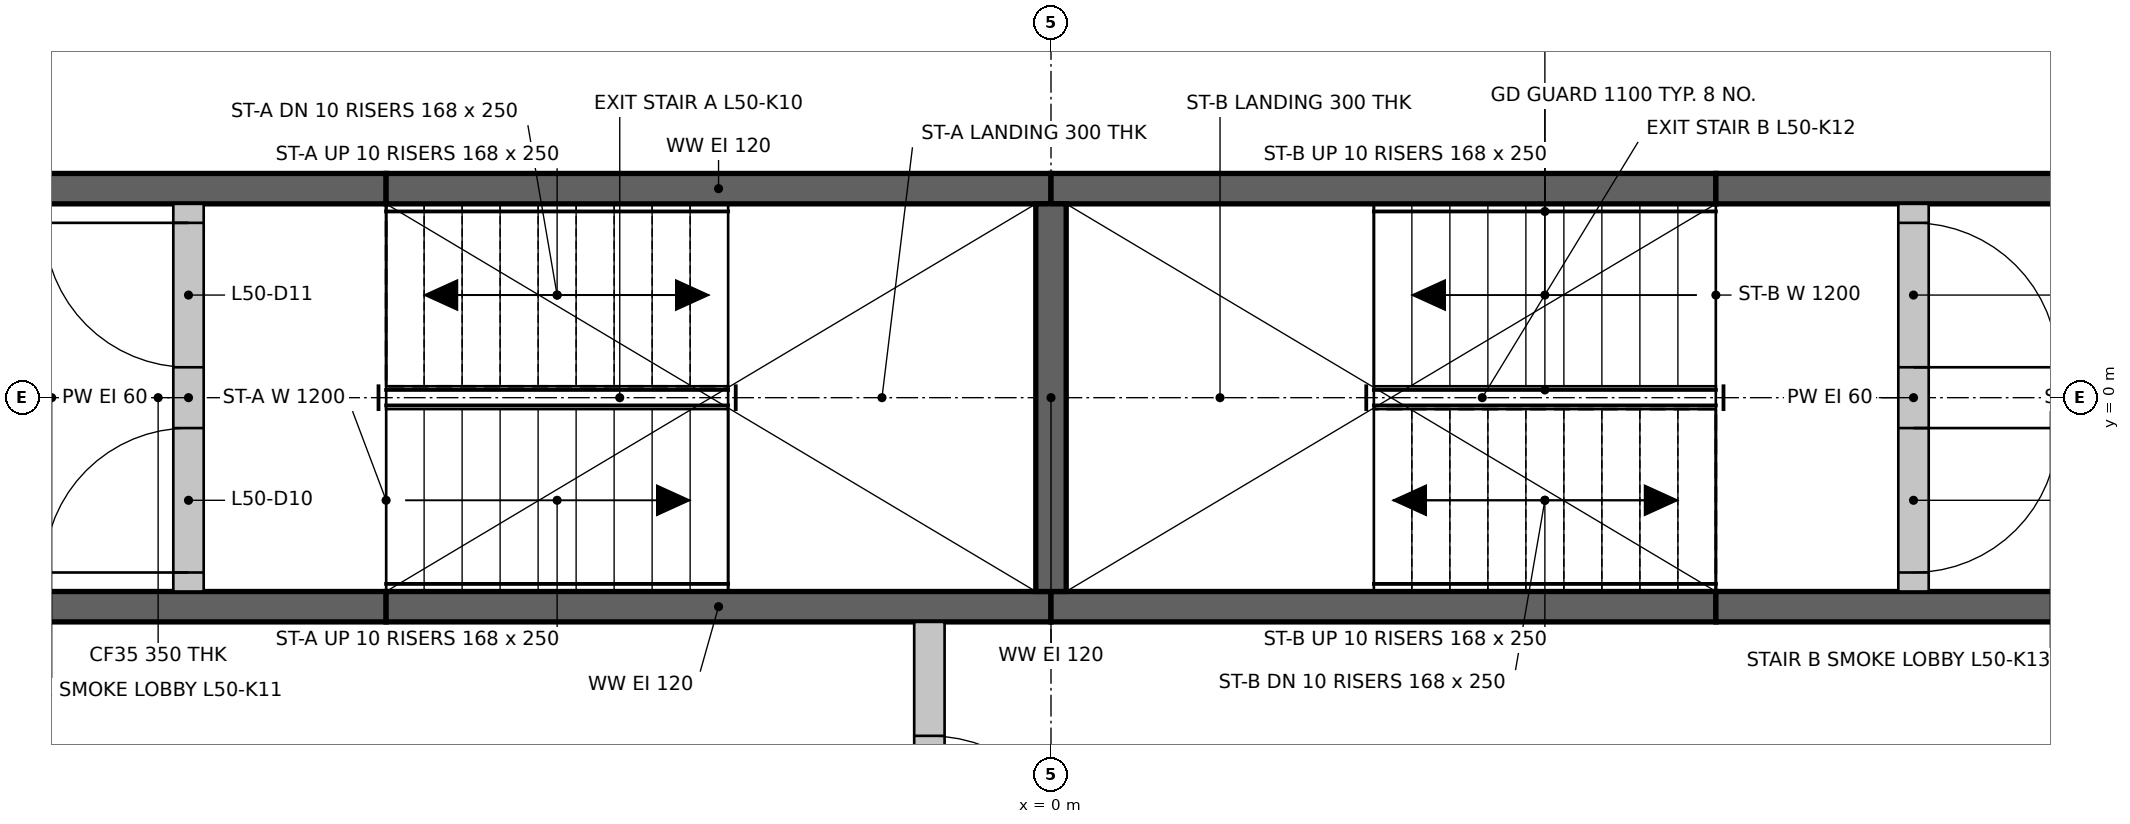
"""IFC4 building model, lengths in metres.
Left out: names, types, materials, properties, quantities, classifications, styles, units other than length and angle.
Written with IfcOpenShell. Run it as: python <this file> out.ifc"""

import sys

from ifc_helpers import new_model, si_unit, direction, frame, frame_2d, origin, place, context, subcontext, project, spatial, rectangle, extrude, element, fill, save


model = new_model("IFC4")
c1 = context("Model", 3, precision=1e-05, world=origin(), true_north=direction((0.0, 1.0)))
c2 = subcontext(c1, "Body", "Model", "MODEL_VIEW")
j1 = project(units=[si_unit("LENGTHUNIT", "METRE"), si_unit("PLANEANGLEUNIT", "RADIAN")], contexts=[c1])
p1 = place(None, origin())
s1 = spatial("IfcSite", under=j1, at=p1, CompositionType="ELEMENT")
p2 = place(p1, origin())
s2 = spatial("IfcBuilding", under=s1, at=p2, CompositionType="ELEMENT")
p3 = place(p2, frame((0.0, 0.0, 191.0)))
s3 = spatial("IfcBuildingStorey", under=s2, at=p3, CompositionType="ELEMENT", Elevation=191.0)
p4 = place(p3, frame((-7.374, -1.375, 0.0), z_axis=(0.0, 0.0, 1.0), x_axis=(1.0, 0.0, 0.0)))
e1 = element("IfcWall", 1, at=p4, inside=s3, PredefinedType="SHEAR", context=c2, shape_type="SweptSolid", body=[
    extrude(rectangle(XDim=3.0, YDim=0.2, at=frame_2d((1.5, 0.0))), origin(), (0.0, 0.0, 1.0), 3.0),
])
for number, where, z_axis, x_axis in (
    (2, (-4.374, -1.375, 0.0), (0.0, 0.0, 1.0), (1.0, 0.0, 0.0)),
    (3, (0.0, -1.375, 0.0), (0.0, 0.0, 1.0), (1.0, 0.0, 0.0)),
):
    element("IfcWall", number, at=place(p3, frame(where, z_axis=z_axis, x_axis=x_axis)), inside=s3, PredefinedType="SHEAR", context=c2, shape_type="SweptSolid", body=[
        extrude(rectangle(XDim=4.374, YDim=0.2, at=frame_2d((2.187, 0.0))), origin(), (0.0, 0.0, 1.0), 3.0),
    ])
for number, where, z_axis, x_axis in (
    (4, (4.374, -1.375, 0.0), (0.0, 0.0, 1.0), (1.0, 0.0, 0.0)),
    (5, (-7.374, 1.375, 0.0), (0.0, 0.0, 1.0), (1.0, 0.0, 0.0)),
):
    element("IfcWall", number, at=place(p3, frame(where, z_axis=z_axis, x_axis=x_axis)), inside=s3, PredefinedType="SHEAR", context=c2, shape_type="SweptSolid", body=[
        extrude(rectangle(XDim=3.0, YDim=0.2, at=frame_2d((1.5, 0.0))), origin(), (0.0, 0.0, 1.0), 3.0),
    ])
for number, where, z_axis, x_axis in (
    (6, (-4.374, 1.375, 0.0), (0.0, 0.0, 1.0), (1.0, 0.0, 0.0)),
    (7, (0.0, 1.375, 0.0), (0.0, 0.0, 1.0), (1.0, 0.0, 0.0)),
):
    element("IfcWall", number, at=place(p3, frame(where, z_axis=z_axis, x_axis=x_axis)), inside=s3, PredefinedType="SHEAR", context=c2, shape_type="SweptSolid", body=[
        extrude(rectangle(XDim=4.374, YDim=0.2, at=frame_2d((2.187, 0.0))), origin(), (0.0, 0.0, 1.0), 3.0),
    ])
p5 = place(p3, frame((4.374, 1.375, 0.0), z_axis=(0.0, 0.0, 1.0), x_axis=(1.0, 0.0, 0.0)))
e8 = element("IfcWall", 8, at=p5, inside=s3, PredefinedType="SHEAR", context=c2, shape_type="SweptSolid", body=[
    extrude(rectangle(XDim=3.0, YDim=0.2, at=frame_2d((1.5, 0.0))), origin(), (0.0, 0.0, 1.0), 3.0),
])
p6 = place(p3, frame((0.0, -1.275, 0.0), z_axis=(0.0, 0.0, 1.0), x_axis=(0.0, 1.0, 0.0)))
e9 = element("IfcWall", 9, at=p6, inside=s3, PredefinedType="SHEAR", context=c2, shape_type="SweptSolid", body=[
    extrude(rectangle(XDim=2.55, YDim=0.2, at=frame_2d((1.275, 0.0))), origin(), (0.0, 0.0, 1.0), 3.0),
])
p7 = place(p3, frame((-0.8, -3.974, 0.0), z_axis=(0.0, 0.0, 1.0), x_axis=(0.0, 1.0, 0.0)))
e10 = element("IfcWall", 10, at=p7, inside=s3, PredefinedType="PARTITIONING", context=c2, shape_type="SweptSolid", body=[
    extrude(rectangle(XDim=2.499, YDim=0.2, at=frame_2d((1.25, 0.0))), origin(), (0.0, 0.0, 1.0), 3.0),
])
p8 = place(p7, frame((0.75, 0.0, 0.0)))
e11 = element("IfcOpeningElement", 11, at=p8, cuts=e10, PredefinedType="OPENING", context=c2, shape_type="SweptSolid", body=[
    extrude(rectangle(XDim=1.0, YDim=2.1, at=frame_2d((0.5, 1.05))), frame((0.0, 0.11, 0.0), z_axis=(0.0, -1.0, 0.0), x_axis=(1.0, 0.0, 0.0)), (0.0, 0.0, 1.0), 0.22),
])
p9 = place(p3, frame((-5.674, -1.275, 0.0), z_axis=(0.0, 0.0, 1.0), x_axis=(0.0, 1.0, 0.0)))
e12 = element("IfcWall", 12, at=p9, inside=s3, PredefinedType="PARTITIONING", context=c2, shape_type="SweptSolid", body=[
    extrude(rectangle(XDim=2.55, YDim=0.2, at=frame_2d((1.275, 0.0))), origin(), (0.0, 0.0, 1.0), 3.0),
])
p10 = place(p9, frame((0.125, 0.0, 0.0)))
e13 = element("IfcOpeningElement", 13, at=p10, cuts=e12, PredefinedType="OPENING", context=c2, shape_type="SweptSolid", body=[
    extrude(rectangle(XDim=0.95, YDim=2.1, at=frame_2d((0.475, 1.05))), frame((0.0, 0.11, 0.0), z_axis=(0.0, -1.0, 0.0), x_axis=(1.0, 0.0, 0.0)), (0.0, 0.0, 1.0), 0.22),
])
p11 = place(p9, frame((1.475, 0.0, 0.0)))
e14 = element("IfcOpeningElement", 14, at=p11, cuts=e12, PredefinedType="OPENING", context=c2, shape_type="SweptSolid", body=[
    extrude(rectangle(XDim=0.95, YDim=2.1, at=frame_2d((0.475, 1.05))), frame((0.0, 0.11, 0.0), z_axis=(0.0, -1.0, 0.0), x_axis=(1.0, 0.0, 0.0)), (0.0, 0.0, 1.0), 0.22),
])
p12 = place(p3, frame((5.674, -1.275, 0.0), z_axis=(0.0, 0.0, 1.0), x_axis=(0.0, 1.0, 0.0)))
e15 = element("IfcWall", 15, at=p12, inside=s3, PredefinedType="PARTITIONING", context=c2, shape_type="SweptSolid", body=[
    extrude(rectangle(XDim=2.55, YDim=0.2, at=frame_2d((1.275, 0.0))), origin(), (0.0, 0.0, 1.0), 3.0),
])
p13 = place(p12, frame((0.125, 0.0, 0.0)))
e16 = element("IfcOpeningElement", 16, at=p13, cuts=e15, PredefinedType="OPENING", context=c2, shape_type="SweptSolid", body=[
    extrude(rectangle(XDim=0.95, YDim=2.1, at=frame_2d((0.475, 1.05))), frame((0.0, 0.11, 0.0), z_axis=(0.0, -1.0, 0.0), x_axis=(1.0, 0.0, 0.0)), (0.0, 0.0, 1.0), 0.22),
])
p14 = place(p12, frame((1.475, 0.0, 0.0)))
e17 = element("IfcOpeningElement", 17, at=p14, cuts=e15, PredefinedType="OPENING", context=c2, shape_type="SweptSolid", body=[
    extrude(rectangle(XDim=0.95, YDim=2.1, at=frame_2d((0.475, 1.05))), frame((0.0, 0.11, 0.0), z_axis=(0.0, -1.0, 0.0), x_axis=(1.0, 0.0, 0.0)), (0.0, 0.0, 1.0), 0.22),
])
p15 = place(p10, origin())
e18 = element("IfcDoor", 18, at=p15, inside=s3, OperationType="SINGLE_SWING_LEFT", PredefinedType="DOOR", context=c2, shape_type="SweptSolid", body=[
    extrude(rectangle(XDim=0.95, YDim=2.1, at=frame_2d((0.475, 1.05))), frame((0.0, 0.025, 0.0), z_axis=(0.0, -1.0, 0.0), x_axis=(1.0, 0.0, 0.0)), (0.0, 0.0, 1.0), 0.05),
])
fill(e13, e18)
p16 = place(p11, origin())
e19 = element("IfcDoor", 19, at=p16, inside=s3, OperationType="SINGLE_SWING_RIGHT", PredefinedType="DOOR", context=c2, shape_type="SweptSolid", body=[
    extrude(rectangle(XDim=0.95, YDim=2.1, at=frame_2d((0.475, 1.05))), frame((0.0, 0.025, 0.0), z_axis=(0.0, -1.0, 0.0), x_axis=(1.0, 0.0, 0.0)), (0.0, 0.0, 1.0), 0.05),
])
fill(e14, e19)
p17 = place(p13, frame((0.95, 0.0, 0.0), z_axis=(0.0, 0.0, 1.0), x_axis=(-1.0, 0.0, 0.0)))
e20 = element("IfcDoor", 20, at=p17, inside=s3, OperationType="SINGLE_SWING_RIGHT", PredefinedType="DOOR", context=c2, shape_type="SweptSolid", body=[
    extrude(rectangle(XDim=0.95, YDim=2.1, at=frame_2d((0.475, 1.05))), frame((0.0, 0.025, 0.0), z_axis=(0.0, -1.0, 0.0), x_axis=(1.0, 0.0, 0.0)), (0.0, 0.0, 1.0), 0.05),
])
fill(e16, e20)
p18 = place(p14, frame((0.95, 0.0, 0.0), z_axis=(0.0, 0.0, 1.0), x_axis=(-1.0, 0.0, 0.0)))
e21 = element("IfcDoor", 21, at=p18, inside=s3, OperationType="SINGLE_SWING_LEFT", PredefinedType="DOOR", context=c2, shape_type="SweptSolid", body=[
    extrude(rectangle(XDim=0.95, YDim=2.1, at=frame_2d((0.475, 1.05))), frame((0.0, 0.025, 0.0), z_axis=(0.0, -1.0, 0.0), x_axis=(1.0, 0.0, 0.0)), (0.0, 0.0, 1.0), 0.05),
])
fill(e17, e21)
p19 = place(p8, frame((1.0, 0.0, 0.0), z_axis=(0.0, 0.0, 1.0), x_axis=(-1.0, 0.0, 0.0)))
e22 = element("IfcDoor", 22, at=p19, inside=s3, OperationType="SINGLE_SWING_LEFT", PredefinedType="DOOR", context=c2, shape_type="SweptSolid", body=[
    extrude(rectangle(XDim=1.0, YDim=2.1, at=frame_2d((0.5, 1.05))), frame((0.0, 0.025, 0.0), z_axis=(0.0, -1.0, 0.0), x_axis=(1.0, 0.0, 0.0)), (0.0, 0.0, 1.0), 0.05),
])
fill(e11, e22)
save(model, sys.argv[1])
